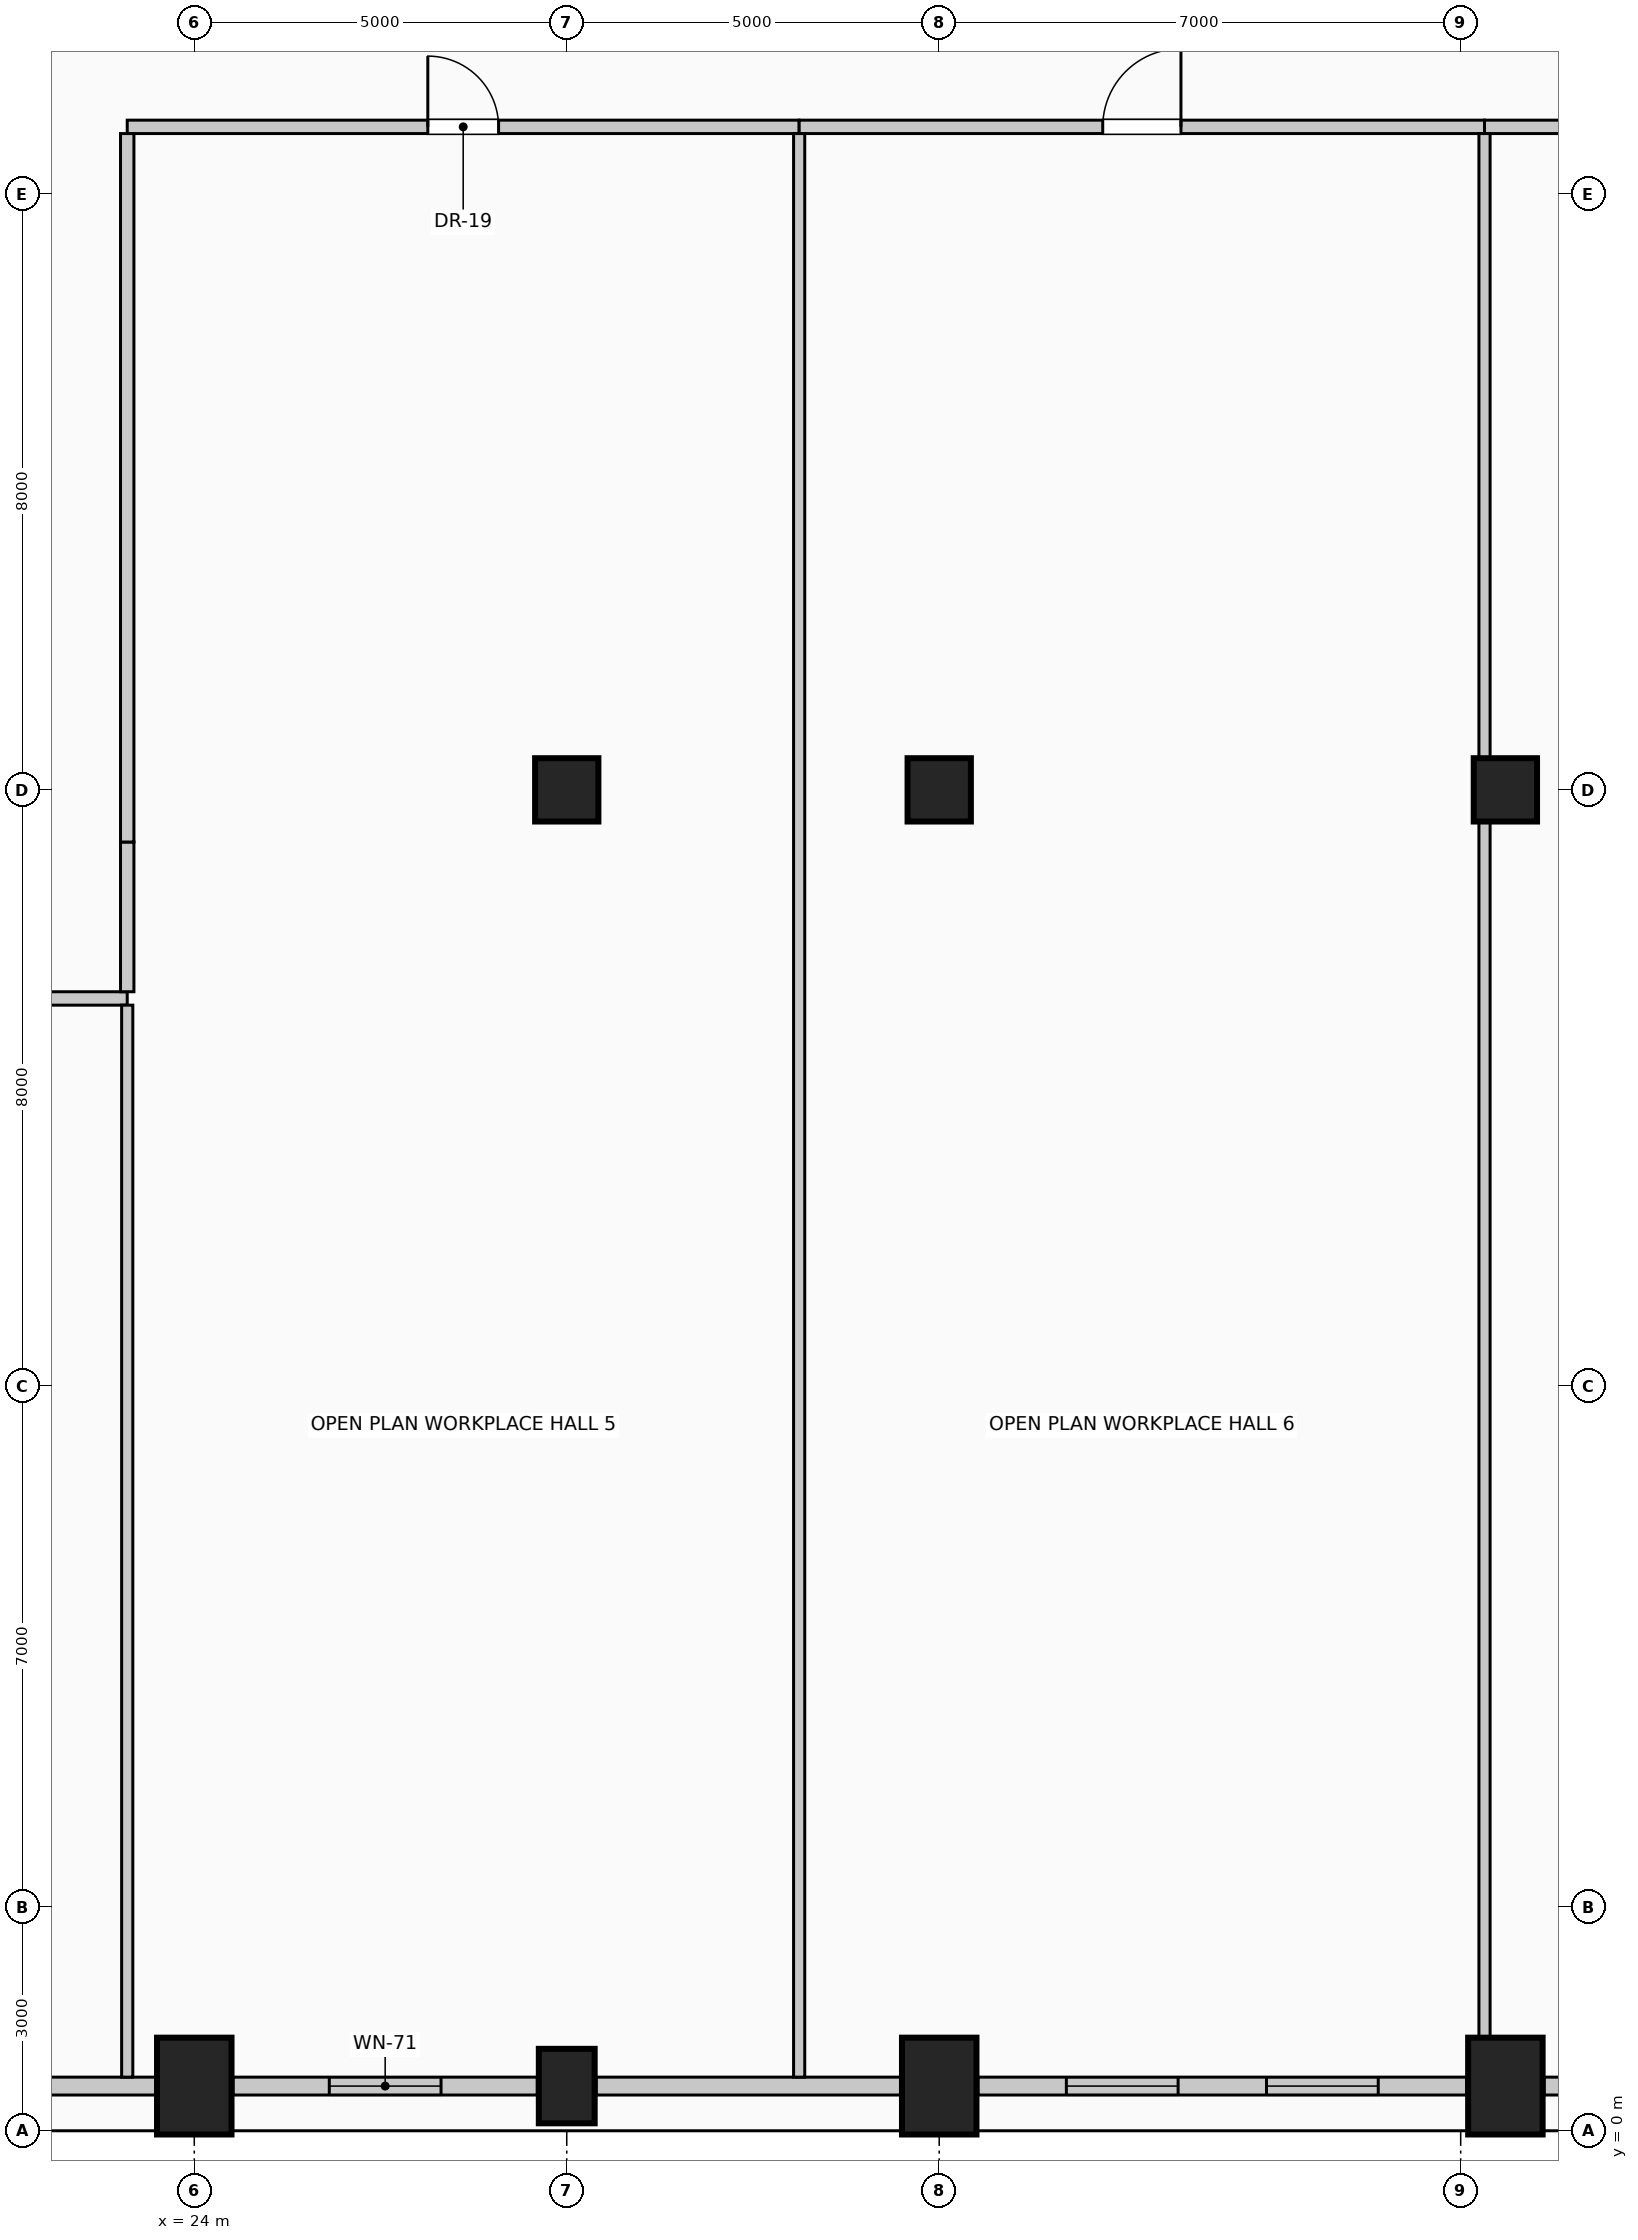
"""IFC4 building model, lengths in metres.
Left out: names, types, materials, properties, quantities, classifications, styles, units other than length and angle.
Written with IfcOpenShell. Run it as: python <this file> out.ifc"""

import sys

from ifc_helpers import new_model, si_unit, direction, frame, frame_2d, origin, origin_2d, place, context, subcontext, project, spatial, rectangle, circle, extrude, element, fill, save


model = new_model("IFC4")
c1 = context("Model", 3, precision=1e-05, world=origin(), true_north=direction((0.0, 1.0)))
c2 = subcontext(c1, "Body", "Model", "MODEL_VIEW")
j1 = project(units=[si_unit("LENGTHUNIT", "METRE"), si_unit("PLANEANGLEUNIT", "RADIAN")], contexts=[c1])
p1 = place(None, origin())
s1 = spatial("IfcSite", under=j1, at=p1, CompositionType="ELEMENT")
p2 = place(p1, origin())
s2 = spatial("IfcBuilding", under=s1, at=p2, CompositionType="ELEMENT")
p3 = place(p2, frame((0.0, 0.0, 252.6)))
s3 = spatial("IfcBuildingStorey", under=s2, at=p3, CompositionType="ELEMENT", Elevation=252.6)
p4 = place(p3, frame((24.0, 0.6, 0.0), z_axis=(0.0, 0.0, 1.0), x_axis=(1.0, 0.0, 0.0)))
e1 = element("IfcColumn", 1, at=p4, inside=s3, PredefinedType="COLUMN", context=c2, shape_type="SweptSolid", body=[
    extrude(rectangle(XDim=1.0, YDim=1.3, at=origin_2d()), origin(), (0.0, 0.0, 1.0), 4.0),
])
p5 = place(p3, frame((29.0, 0.6, 0.0), z_axis=(0.0, 0.0, 1.0), x_axis=(1.0, 0.0, 0.0)))
e2 = element("IfcColumn", 2, at=p5, inside=s3, PredefinedType="COLUMN", context=c2, shape_type="SweptSolid", body=[
    extrude(rectangle(XDim=0.75, YDim=1.0, at=origin_2d()), origin(), (0.0, 0.0, 1.0), 4.0),
])
for number, where, z_axis, x_axis in (
    (3, (34.0, 0.6, 0.0), (0.0, 0.0, 1.0), (1.0, 0.0, 0.0)),
    (4, (41.6, 0.6, 0.0), (0.0, 0.0, 1.0), (1.0, 0.0, 0.0)),
):
    element("IfcColumn", number, at=place(p3, frame(where, z_axis=z_axis, x_axis=x_axis)), inside=s3, PredefinedType="COLUMN", context=c2, shape_type="SweptSolid", body=[
        extrude(rectangle(XDim=1.0, YDim=1.3, at=origin_2d()), origin(), (0.0, 0.0, 1.0), 4.0),
    ])
for number, where, z_axis, x_axis in (
    (5, (29.0, 18.0, 0.0), (0.0, 0.0, 1.0), (1.0, 0.0, 0.0)),
    (6, (41.6, 18.0, 0.0), (0.0, 0.0, 1.0), (1.0, 0.0, 0.0)),
    (7, (34.0, 18.0, 0.0), (0.0, 0.0, 1.0), (1.0, 0.0, 0.0)),
):
    element("IfcColumn", number, at=place(p3, frame(where, z_axis=z_axis, x_axis=x_axis)), inside=s3, PredefinedType="COLUMN", context=c2, shape_type="SweptSolid", body=[
        extrude(circle(Radius=0.425, at=origin_2d()), origin(), (0.0, 0.0, 1.0), 4.0),
    ])
p6 = place(p3, frame((23.48, 0.6, 0.0), z_axis=(0.0, 0.0, 1.0), x_axis=(-1.0, 0.0, 0.0)))
e8 = element("IfcWall", 8, at=p6, inside=s3, PredefinedType="SOLIDWALL", context=c2, shape_type="SweptSolid", body=[
    extrude(rectangle(XDim=6.56, YDim=0.24, at=frame_2d((3.28, 0.0))), origin(), (0.0, 0.0, 1.0), 3.0),
])
p7 = place(p3, frame((28.605, 0.6, 0.0), z_axis=(0.0, 0.0, 1.0), x_axis=(-1.0, 0.0, 0.0)))
e9 = element("IfcWall", 9, at=p7, inside=s3, PredefinedType="SOLIDWALL", context=c2, shape_type="SweptSolid", body=[
    extrude(rectangle(XDim=4.085, YDim=0.24, at=frame_2d((2.042, 0.0))), origin(), (0.0, 0.0, 1.0), 3.0),
])
p8 = place(p7, frame((1.292, 0.0, 0.42)))
e10 = element("IfcOpeningElement", 10, at=p8, cuts=e9, PredefinedType="OPENING", context=c2, shape_type="SweptSolid", body=[
    extrude(rectangle(XDim=1.5, YDim=2.2, at=frame_2d((0.75, 1.1))), frame((0.0, 0.13, 0.0), z_axis=(0.0, -1.0, 0.0), x_axis=(1.0, 0.0, 0.0)), (0.0, 0.0, 1.0), 0.26),
])
p9 = place(p3, frame((33.48, 0.6, 0.0), z_axis=(0.0, 0.0, 1.0), x_axis=(-1.0, 0.0, 0.0)))
e11 = element("IfcWall", 11, at=p9, inside=s3, PredefinedType="SOLIDWALL", context=c2, shape_type="SweptSolid", body=[
    extrude(rectangle(XDim=4.085, YDim=0.24, at=frame_2d((2.042, 0.0))), origin(), (0.0, 0.0, 1.0), 3.0),
])
p10 = place(p3, frame((41.08, 0.6, 0.0), z_axis=(0.0, 0.0, 1.0), x_axis=(-1.0, 0.0, 0.0)))
e12 = element("IfcWall", 12, at=p10, inside=s3, PredefinedType="SOLIDWALL", context=c2, shape_type="SweptSolid", body=[
    extrude(rectangle(XDim=6.56, YDim=0.24, at=frame_2d((3.28, 0.0))), origin(), (0.0, 0.0, 1.0), 3.0),
])
p11 = place(p10, frame((1.187, 0.0, 0.42)))
e13 = element("IfcOpeningElement", 13, at=p11, cuts=e12, PredefinedType="OPENING", context=c2, shape_type="SweptSolid", body=[
    extrude(rectangle(XDim=1.5, YDim=2.2, at=frame_2d((0.75, 1.1))), frame((0.0, 0.13, 0.0), z_axis=(0.0, -1.0, 0.0), x_axis=(1.0, 0.0, 0.0)), (0.0, 0.0, 1.0), 0.26),
])
p12 = place(p10, frame((3.873, 0.0, 0.42)))
e14 = element("IfcOpeningElement", 14, at=p12, cuts=e12, PredefinedType="OPENING", context=c2, shape_type="SweptSolid", body=[
    extrude(rectangle(XDim=1.5, YDim=2.2, at=frame_2d((0.75, 1.1))), frame((0.0, 0.13, 0.0), z_axis=(0.0, -1.0, 0.0), x_axis=(1.0, 0.0, 0.0)), (0.0, 0.0, 1.0), 0.26),
])
p13 = place(p3, frame((43.605, 0.6, 0.0), z_axis=(0.0, 0.0, 1.0), x_axis=(-1.0, 0.0, 0.0)))
e15 = element("IfcWall", 15, at=p13, inside=s3, PredefinedType="SOLIDWALL", context=c2, shape_type="SweptSolid", body=[
    extrude(rectangle(XDim=1.485, YDim=0.24, at=frame_2d((0.742, 0.0))), origin(), (0.0, 0.0, 1.0), 3.0),
])
p14 = place(p3, frame((18.72, 15.2, 0.0), z_axis=(0.0, 0.0, 1.0), x_axis=(1.0, 0.0, 0.0)))
e16 = element("IfcWall", 16, at=p14, inside=s3, PredefinedType="PARTITIONING", context=c2, shape_type="SweptSolid", body=[
    extrude(rectangle(XDim=4.38, YDim=0.18, at=frame_2d((2.19, 0.0))), origin(), (0.0, 0.0, 1.0), 3.75),
])
p15 = place(p14, frame((1.75, 0.0, 0.0)))
e17 = element("IfcOpeningElement", 17, at=p15, cuts=e16, PredefinedType="OPENING", context=c2, shape_type="SweptSolid", body=[
    extrude(rectangle(XDim=0.88, YDim=2.1, at=frame_2d((0.44, 1.05))), frame((0.0, 0.1, 0.0), z_axis=(0.0, -1.0, 0.0), x_axis=(1.0, 0.0, 0.0)), (0.0, 0.0, 1.0), 0.2),
])
p16 = place(p3, frame((23.1, 26.9, 0.0), z_axis=(0.0, 0.0, 1.0), x_axis=(1.0, 0.0, 0.0)))
e18 = element("IfcWall", 18, at=p16, inside=s3, PredefinedType="PARTITIONING", context=c2, shape_type="SweptSolid", body=[
    extrude(rectangle(XDim=9.02, YDim=0.18, at=frame_2d((4.51, 0.0))), origin(), (0.0, 0.0, 1.0), 3.75),
])
p17 = place(p16, frame((4.035, 0.0, 0.0)))
e19 = element("IfcOpeningElement", 19, at=p17, cuts=e18, PredefinedType="OPENING", context=c2, shape_type="SweptSolid", body=[
    extrude(rectangle(XDim=0.95, YDim=2.15, at=frame_2d((0.475, 1.075))), frame((0.0, 0.1, 0.0), z_axis=(0.0, -1.0, 0.0), x_axis=(1.0, 0.0, 0.0)), (0.0, 0.0, 1.0), 0.2),
])
p18 = place(p3, frame((32.12, 26.9, 0.0), z_axis=(0.0, 0.0, 1.0), x_axis=(1.0, 0.0, 0.0)))
e20 = element("IfcWall", 20, at=p18, inside=s3, PredefinedType="PARTITIONING", context=c2, shape_type="SweptSolid", body=[
    extrude(rectangle(XDim=9.2, YDim=0.18, at=frame_2d((4.6, 0.0))), origin(), (0.0, 0.0, 1.0), 3.75),
])
p19 = place(p18, frame((4.075, 0.0, 0.0)))
e21 = element("IfcOpeningElement", 21, at=p19, cuts=e20, PredefinedType="OPENING", context=c2, shape_type="SweptSolid", body=[
    extrude(rectangle(XDim=1.05, YDim=2.15, at=frame_2d((0.525, 1.075))), frame((0.0, 0.1, 0.0), z_axis=(0.0, -1.0, 0.0), x_axis=(1.0, 0.0, 0.0)), (0.0, 0.0, 1.0), 0.2),
])
p20 = place(p3, frame((41.32, 26.9, 0.0), z_axis=(0.0, 0.0, 1.0), x_axis=(1.0, 0.0, 0.0)))
e22 = element("IfcWall", 22, at=p20, inside=s3, PredefinedType="PARTITIONING", context=c2, shape_type="SweptSolid", body=[
    extrude(rectangle(XDim=8.18, YDim=0.18, at=frame_2d((4.09, 0.0))), origin(), (0.0, 0.0, 1.0), 3.75),
])
p21 = place(p20, frame((3.615, 0.0, 0.0)))
e23 = element("IfcOpeningElement", 23, at=p21, cuts=e22, PredefinedType="OPENING", context=c2, shape_type="SweptSolid", body=[
    extrude(rectangle(XDim=0.95, YDim=2.15, at=frame_2d((0.475, 1.075))), frame((0.0, 0.1, 0.0), z_axis=(0.0, -1.0, 0.0), x_axis=(1.0, 0.0, 0.0)), (0.0, 0.0, 1.0), 0.2),
])
p22 = place(p3, frame((23.1, 0.72, 0.0), z_axis=(0.0, 0.0, 1.0), x_axis=(0.0, 1.0, 0.0)))
e24 = element("IfcWall", 24, at=p22, inside=s3, PredefinedType="PARTITIONING", context=c2, shape_type="SweptSolid", body=[
    extrude(rectangle(XDim=14.39, YDim=0.15, at=frame_2d((7.195, 0.0))), origin(), (0.0, 0.0, 1.0), 3.75),
])
p23 = place(p3, frame((23.1, 15.29, 0.0), z_axis=(0.0, 0.0, 1.0), x_axis=(0.0, 1.0, 0.0)))
e25 = element("IfcWall", 25, at=p23, inside=s3, PredefinedType="PARTITIONING", context=c2, shape_type="SweptSolid", body=[
    extrude(rectangle(XDim=2.01, YDim=0.18, at=frame_2d((1.005, 0.0))), origin(), (0.0, 0.0, 1.0), 3.75),
])
p24 = place(p3, frame((23.1, 17.3, 0.0), z_axis=(0.0, 0.0, 1.0), x_axis=(0.0, 1.0, 0.0)))
e26 = element("IfcWall", 26, at=p24, inside=s3, PredefinedType="PARTITIONING", context=c2, shape_type="SweptSolid", body=[
    extrude(rectangle(XDim=9.51, YDim=0.18, at=frame_2d((4.755, 0.0))), origin(), (0.0, 0.0, 1.0), 3.75),
])
p25 = place(p3, frame((32.12, 0.72, 0.0), z_axis=(0.0, 0.0, 1.0), x_axis=(0.0, 1.0, 0.0)))
e27 = element("IfcWall", 27, at=p25, inside=s3, PredefinedType="PARTITIONING", context=c2, shape_type="SweptSolid", body=[
    extrude(rectangle(XDim=26.09, YDim=0.15, at=frame_2d((13.045, 0.0))), origin(), (0.0, 0.0, 1.0), 3.75),
])
p26 = place(p3, frame((41.32, 1.25, 0.0), z_axis=(0.0, 0.0, 1.0), x_axis=(0.0, 1.0, 0.0)))
e28 = element("IfcWall", 28, at=p26, inside=s3, PredefinedType="PARTITIONING", context=c2, shape_type="SweptSolid", body=[
    extrude(rectangle(XDim=16.325, YDim=0.15, at=frame_2d((8.163, 0.0))), origin(), (0.0, 0.0, 1.0), 3.195),
])
p27 = place(p3, frame((41.32, 18.425, 0.0), z_axis=(0.0, 0.0, 1.0), x_axis=(0.0, 1.0, 0.0)))
e29 = element("IfcWall", 29, at=p27, inside=s3, PredefinedType="PARTITIONING", context=c2, shape_type="SweptSolid", body=[
    extrude(rectangle(XDim=8.385, YDim=0.15, at=frame_2d((4.192, 0.0))), origin(), (0.0, 0.0, 1.0), 3.195),
])
p28 = place(p8, origin())
e30 = element("IfcWindow", 30, at=p28, inside=s3, PartitioningType="SINGLE_PANEL", PredefinedType="WINDOW", context=c2, shape_type="SweptSolid", body=[
    extrude(rectangle(XDim=1.5, YDim=2.2, at=frame_2d((0.75, 1.1))), frame((0.0, 0.03, 0.0), z_axis=(0.0, -1.0, 0.0), x_axis=(1.0, 0.0, 0.0)), (0.0, 0.0, 1.0), 0.06),
])
fill(e10, e30)
p29 = place(p11, origin())
e31 = element("IfcWindow", 31, at=p29, inside=s3, PartitioningType="SINGLE_PANEL", PredefinedType="WINDOW", context=c2, shape_type="SweptSolid", body=[
    extrude(rectangle(XDim=1.5, YDim=2.2, at=frame_2d((0.75, 1.1))), frame((0.0, 0.03, 0.0), z_axis=(0.0, -1.0, 0.0), x_axis=(1.0, 0.0, 0.0)), (0.0, 0.0, 1.0), 0.06),
])
fill(e13, e31)
p30 = place(p12, origin())
e32 = element("IfcWindow", 32, at=p30, inside=s3, PartitioningType="SINGLE_PANEL", PredefinedType="WINDOW", context=c2, shape_type="SweptSolid", body=[
    extrude(rectangle(XDim=1.5, YDim=2.2, at=frame_2d((0.75, 1.1))), frame((0.0, 0.03, 0.0), z_axis=(0.0, -1.0, 0.0), x_axis=(1.0, 0.0, 0.0)), (0.0, 0.0, 1.0), 0.06),
])
fill(e14, e32)
p31 = place(p17, origin())
e33 = element("IfcDoor", 33, at=p31, inside=s3, OperationType="SINGLE_SWING_LEFT", PredefinedType="DOOR", context=c2, shape_type="SweptSolid", body=[
    extrude(rectangle(XDim=0.95, YDim=2.15, at=frame_2d((0.475, 1.075))), frame((0.0, 0.025, 0.0), z_axis=(0.0, -1.0, 0.0), x_axis=(1.0, 0.0, 0.0)), (0.0, 0.0, 1.0), 0.05),
])
fill(e19, e33)
p32 = place(p19, origin())
e34 = element("IfcDoor", 34, at=p32, inside=s3, OperationType="SINGLE_SWING_RIGHT", PredefinedType="DOOR", context=c2, shape_type="SweptSolid", body=[
    extrude(rectangle(XDim=1.05, YDim=2.15, at=frame_2d((0.525, 1.075))), frame((0.0, 0.025, 0.0), z_axis=(0.0, -1.0, 0.0), x_axis=(1.0, 0.0, 0.0)), (0.0, 0.0, 1.0), 0.05),
])
fill(e21, e34)
save(model, sys.argv[1])
